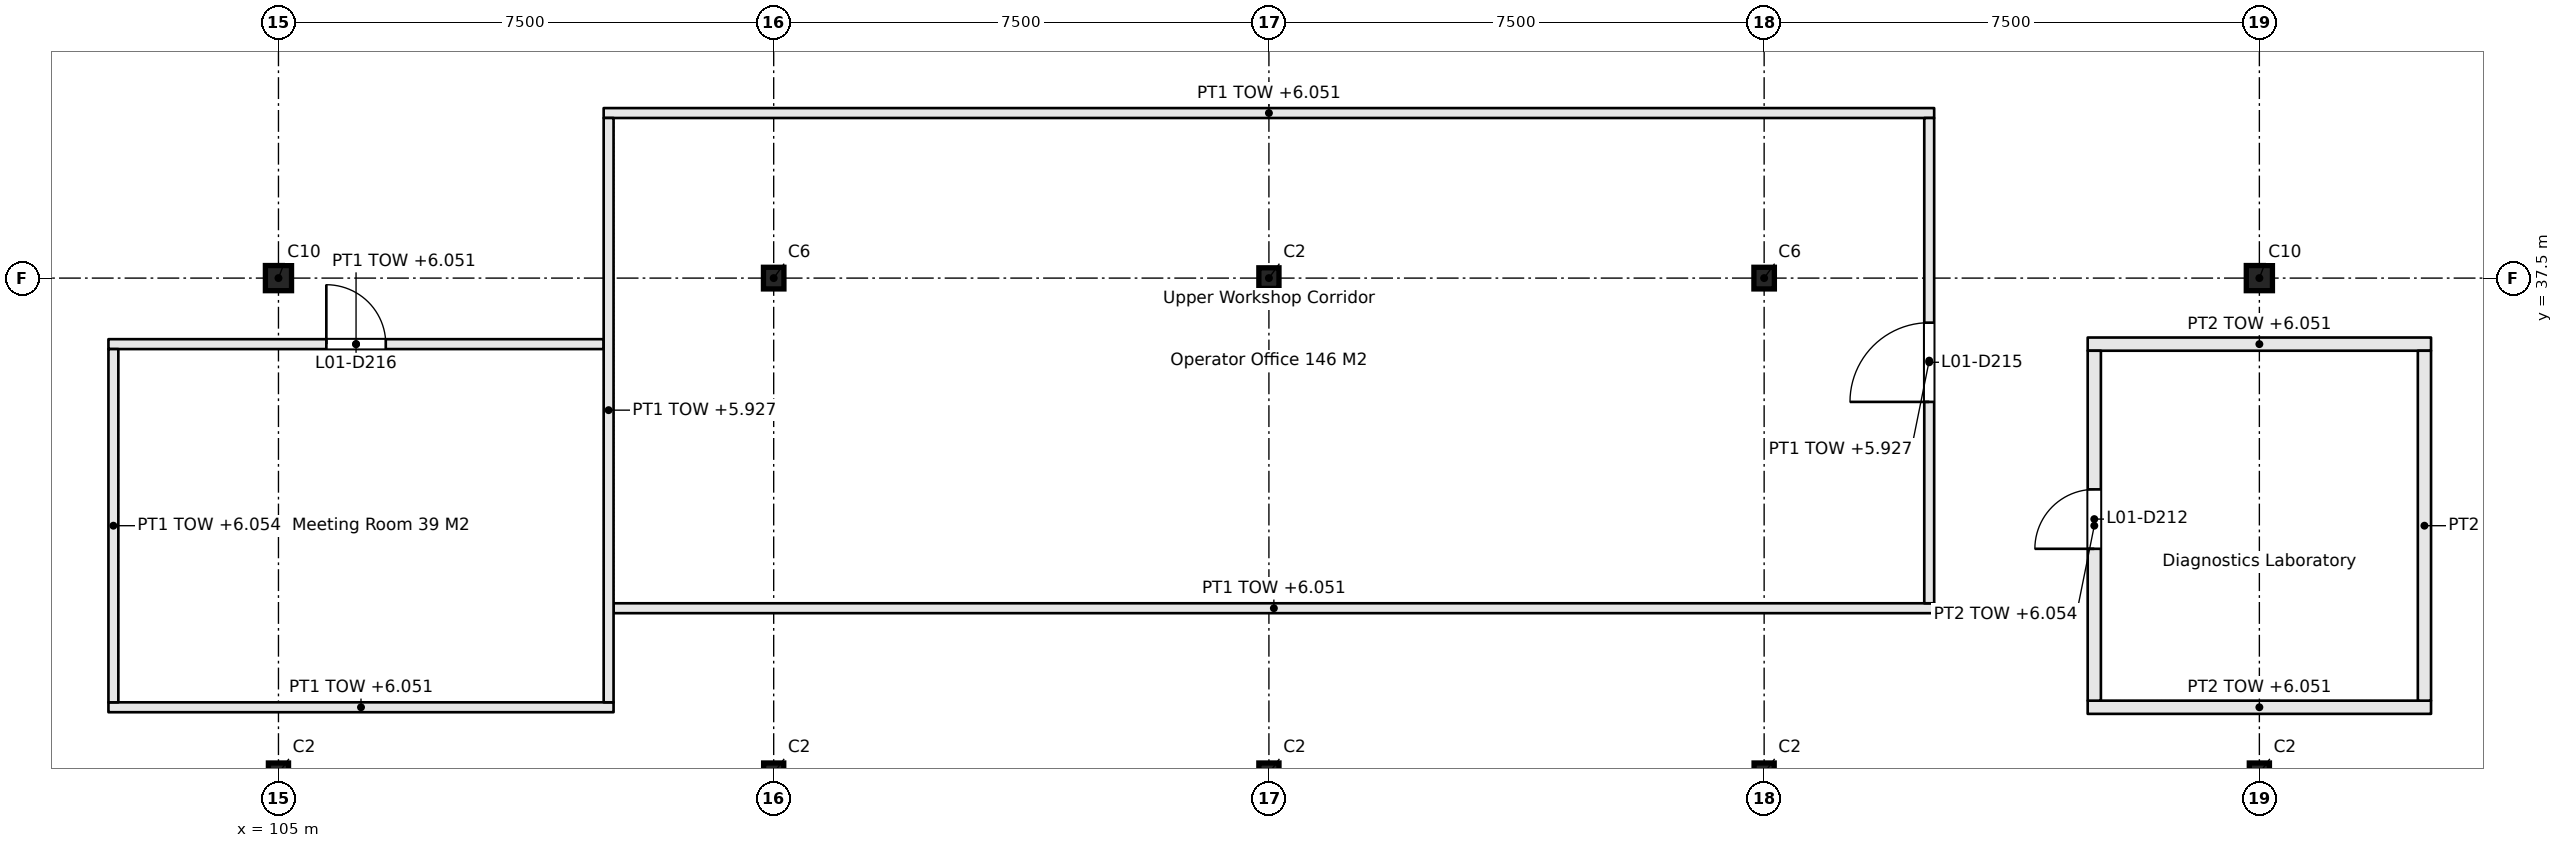
"""IFC4 building model, lengths in metres.
Left out: names, types, materials, properties, quantities, classifications, styles, units other than length and angle.
Written with IfcOpenShell. Run it as: python <this file> out.ifc"""

import sys

from ifc_helpers import new_model, si_unit, direction, frame, frame_2d, origin, origin_2d, place, context, subcontext, project, spatial, rectangle, i_section, extrude, element, fill, save


model = new_model("IFC4")
c1 = context("Model", 3, precision=1e-05, world=origin(), true_north=direction((0.0, 1.0)))
c2 = subcontext(c1, "Body", "Model", "MODEL_VIEW")
j1 = project(units=[si_unit("LENGTHUNIT", "METRE"), si_unit("PLANEANGLEUNIT", "RADIAN")], contexts=[c1])
p1 = place(None, origin())
s1 = spatial("IfcSite", under=j1, at=p1, CompositionType="ELEMENT")
p2 = place(p1, origin())
s2 = spatial("IfcBuilding", under=s1, at=p2, CompositionType="ELEMENT")
p3 = place(p2, frame((0.0, 0.0, 3.3)))
s3 = spatial("IfcBuildingStorey", under=s2, at=p3, CompositionType="ELEMENT", Elevation=3.3)
p4 = place(p3, frame((105.0, 30.0, 0.0), z_axis=(0.0, 0.0, 1.0), x_axis=(1.0, 0.0, 0.0)))
e1 = element("IfcColumn", 1, at=p4, inside=s3, PredefinedType="COLUMN", context=c2, shape_type="SweptSolid", body=[
    extrude(i_section(OverallWidth=0.305, OverallDepth=0.312, WebThickness=0.011, FlangeThickness=0.017, FilletRadius=0.015, at=origin_2d()), origin(), (0.0, 0.0, 1.0), 3.3),
])
p5 = place(p3, frame((105.0, 37.5, 0.0), z_axis=(0.0, 0.0, 1.0), x_axis=(1.0, 0.0, 0.0)))
e2 = element("IfcColumn", 2, at=p5, inside=s3, PredefinedType="COLUMN", context=c2, shape_type="SweptSolid", body=[
    extrude(i_section(OverallWidth=0.396, OverallDepth=0.381, WebThickness=0.019, FlangeThickness=0.03, FilletRadius=0.015, at=origin_2d()), origin(), (0.0, 0.0, 1.0), 3.3),
])
p6 = place(p3, frame((112.5, 30.0, 0.0), z_axis=(0.0, 0.0, 1.0), x_axis=(1.0, 0.0, 0.0)))
e3 = element("IfcColumn", 3, at=p6, inside=s3, PredefinedType="COLUMN", context=c2, shape_type="SweptSolid", body=[
    extrude(i_section(OverallWidth=0.305, OverallDepth=0.312, WebThickness=0.011, FlangeThickness=0.017, FilletRadius=0.015, at=origin_2d()), origin(), (0.0, 0.0, 1.0), 3.3),
])
p7 = place(p3, frame((112.5, 37.5, 0.0), z_axis=(0.0, 0.0, 1.0), x_axis=(1.0, 0.0, 0.0)))
e4 = element("IfcColumn", 4, at=p7, inside=s3, PredefinedType="COLUMN", context=c2, shape_type="SweptSolid", body=[
    extrude(i_section(OverallWidth=0.31, OverallDepth=0.328, WebThickness=0.015, FlangeThickness=0.025, FilletRadius=0.015, at=origin_2d()), origin(), (0.0, 0.0, 1.0), 3.3),
])
for number, where, z_axis, x_axis in (
    (5, (120.0, 30.0, 0.0), (0.0, 0.0, 1.0), (1.0, 0.0, 0.0)),
    (6, (120.0, 37.5, 0.0), (0.0, 0.0, 1.0), (1.0, 0.0, 0.0)),
    (7, (127.5, 30.0, 0.0), (0.0, 0.0, 1.0), (1.0, 0.0, 0.0)),
):
    element("IfcColumn", number, at=place(p3, frame(where, z_axis=z_axis, x_axis=x_axis)), inside=s3, PredefinedType="COLUMN", context=c2, shape_type="SweptSolid", body=[
        extrude(i_section(OverallWidth=0.305, OverallDepth=0.312, WebThickness=0.011, FlangeThickness=0.017, FilletRadius=0.015, at=origin_2d()), origin(), (0.0, 0.0, 1.0), 3.3),
    ])
p8 = place(p3, frame((127.5, 37.5, 0.0), z_axis=(0.0, 0.0, 1.0), x_axis=(1.0, 0.0, 0.0)))
e8 = element("IfcColumn", 8, at=p8, inside=s3, PredefinedType="COLUMN", context=c2, shape_type="SweptSolid", body=[
    extrude(i_section(OverallWidth=0.31, OverallDepth=0.328, WebThickness=0.015, FlangeThickness=0.025, FilletRadius=0.015, at=origin_2d()), origin(), (0.0, 0.0, 1.0), 3.3),
])
p9 = place(p3, frame((135.0, 30.0, 0.0), z_axis=(0.0, 0.0, 1.0), x_axis=(1.0, 0.0, 0.0)))
e9 = element("IfcColumn", 9, at=p9, inside=s3, PredefinedType="COLUMN", context=c2, shape_type="SweptSolid", body=[
    extrude(i_section(OverallWidth=0.305, OverallDepth=0.312, WebThickness=0.011, FlangeThickness=0.017, FilletRadius=0.015, at=origin_2d()), origin(), (0.0, 0.0, 1.0), 3.3),
])
p10 = place(p3, frame((135.0, 37.5, 0.0), z_axis=(0.0, 0.0, 1.0), x_axis=(1.0, 0.0, 0.0)))
e10 = element("IfcColumn", 10, at=p10, inside=s3, PredefinedType="COLUMN", context=c2, shape_type="SweptSolid", body=[
    extrude(i_section(OverallWidth=0.396, OverallDepth=0.381, WebThickness=0.019, FlangeThickness=0.03, FilletRadius=0.015, at=origin_2d()), origin(), (0.0, 0.0, 1.0), 3.3),
])
p11 = place(p3, frame((102.425, 31.0, 0.0), z_axis=(0.0, 0.0, 1.0), x_axis=(1.0, 0.0, 0.0)))
e11 = element("IfcWall", 11, at=p11, inside=s3, PredefinedType="PARTITIONING", context=c2, shape_type="SweptSolid", body=[
    extrude(rectangle(XDim=7.65, YDim=0.15, at=frame_2d((3.825, 0.0))), origin(), (0.0, 0.0, 1.0), 2.751),
])
p12 = place(p3, frame((132.4, 31.0, 0.0), z_axis=(0.0, 0.0, 1.0), x_axis=(1.0, 0.0, 0.0)))
e12 = element("IfcWall", 12, at=p12, inside=s3, PredefinedType="PARTITIONING", context=c2, shape_type="SweptSolid", body=[
    extrude(rectangle(XDim=5.2, YDim=0.2, at=frame_2d((2.6, 0.0))), origin(), (0.0, 0.0, 1.0), 2.751),
])
p13 = place(p3, frame((110.075, 32.5, 0.0), z_axis=(0.0, 0.0, 1.0), x_axis=(1.0, 0.0, 0.0)))
e13 = element("IfcWall", 13, at=p13, inside=s3, PredefinedType="PARTITIONING", context=c2, shape_type="SweptSolid", body=[
    extrude(rectangle(XDim=20.0, YDim=0.15, at=frame_2d((10.0, 0.0))), origin(), (0.0, 0.0, 1.0), 2.751),
])
p14 = place(p3, frame((102.425, 36.5, 0.0), z_axis=(0.0, 0.0, 1.0), x_axis=(1.0, 0.0, 0.0)))
e14 = element("IfcWall", 14, at=p14, inside=s3, PredefinedType="PARTITIONING", context=c2, shape_type="SweptSolid", body=[
    extrude(rectangle(XDim=7.5, YDim=0.15, at=frame_2d((3.75, 0.0))), origin(), (0.0, 0.0, 1.0), 2.751),
])
p15 = place(p14, frame((3.3, 0.0, 0.0)))
e15 = element("IfcOpeningElement", 15, at=p15, cuts=e14, PredefinedType="OPENING", context=c2, shape_type="SweptSolid", body=[
    extrude(rectangle(XDim=0.9, YDim=2.1, at=frame_2d((0.45, 1.05))), frame((0.0, 0.085, 0.0), z_axis=(0.0, -1.0, 0.0), x_axis=(1.0, 0.0, 0.0)), (0.0, 0.0, 1.0), 0.17),
])
p16 = place(p3, frame((132.4, 36.5, 0.0), z_axis=(0.0, 0.0, 1.0), x_axis=(1.0, 0.0, 0.0)))
e16 = element("IfcWall", 16, at=p16, inside=s3, PredefinedType="PARTITIONING", context=c2, shape_type="SweptSolid", body=[
    extrude(rectangle(XDim=5.2, YDim=0.2, at=frame_2d((2.6, 0.0))), origin(), (0.0, 0.0, 1.0), 2.751),
])
p17 = place(p3, frame((109.925, 40.0, 0.0), z_axis=(0.0, 0.0, 1.0), x_axis=(1.0, 0.0, 0.0)))
e17 = element("IfcWall", 17, at=p17, inside=s3, PredefinedType="PARTITIONING", context=c2, shape_type="SweptSolid", body=[
    extrude(rectangle(XDim=20.15, YDim=0.15, at=frame_2d((10.075, 0.0))), origin(), (0.0, 0.0, 1.0), 2.751),
])
p18 = place(p3, frame((102.5, 31.075, 0.0), z_axis=(0.0, 0.0, 1.0), x_axis=(0.0, 1.0, 0.0)))
e18 = element("IfcWall", 18, at=p18, inside=s3, PredefinedType="PARTITIONING", context=c2, shape_type="SweptSolid", body=[
    extrude(rectangle(XDim=5.35, YDim=0.15, at=frame_2d((2.675, 0.0))), origin(), (0.0, 0.0, 1.0), 2.754),
])
p19 = place(p3, frame((110.0, 31.075, 0.0), z_axis=(0.0, 0.0, 1.0), x_axis=(0.0, 1.0, 0.0)))
e19 = element("IfcWall", 19, at=p19, inside=s3, PredefinedType="PARTITIONING", context=c2, shape_type="SweptSolid", body=[
    extrude(rectangle(XDim=8.85, YDim=0.15, at=frame_2d((4.425, 0.0))), origin(), (0.0, 0.0, 1.0), 2.627),
])
p20 = place(p3, frame((130.0, 32.575, 0.0), z_axis=(0.0, 0.0, 1.0), x_axis=(0.0, 1.0, 0.0)))
e20 = element("IfcWall", 20, at=p20, inside=s3, PredefinedType="PARTITIONING", context=c2, shape_type="SweptSolid", body=[
    extrude(rectangle(XDim=7.35, YDim=0.15, at=frame_2d((3.675, 0.0))), origin(), (0.0, 0.0, 1.0), 2.627),
])
p21 = place(p20, frame((3.05, 0.0, 0.0)))
e21 = element("IfcOpeningElement", 21, at=p21, cuts=e20, PredefinedType="OPENING", context=c2, shape_type="SweptSolid", body=[
    extrude(rectangle(XDim=1.2, YDim=2.1, at=frame_2d((0.6, 1.05))), frame((0.0, 0.085, 0.0), z_axis=(0.0, -1.0, 0.0), x_axis=(1.0, 0.0, 0.0)), (0.0, 0.0, 1.0), 0.17),
])
p22 = place(p3, frame((132.5, 31.1, 0.0), z_axis=(0.0, 0.0, 1.0), x_axis=(0.0, 1.0, 0.0)))
e22 = element("IfcWall", 22, at=p22, inside=s3, PredefinedType="PARTITIONING", context=c2, shape_type="SweptSolid", body=[
    extrude(rectangle(XDim=5.3, YDim=0.2, at=frame_2d((2.65, 0.0))), origin(), (0.0, 0.0, 1.0), 2.754),
])
p23 = place(p22, frame((2.3, 0.0, 0.0)))
e23 = element("IfcOpeningElement", 23, at=p23, cuts=e22, PredefinedType="OPENING", context=c2, shape_type="SweptSolid", body=[
    extrude(rectangle(XDim=0.9, YDim=2.1, at=frame_2d((0.45, 1.05))), frame((0.0, 0.11, 0.0), z_axis=(0.0, -1.0, 0.0), x_axis=(1.0, 0.0, 0.0)), (0.0, 0.0, 1.0), 0.22),
])
p24 = place(p3, frame((137.5, 31.1, 0.0), z_axis=(0.0, 0.0, 1.0), x_axis=(0.0, 1.0, 0.0)))
e24 = element("IfcWall", 24, at=p24, inside=s3, PredefinedType="PARTITIONING", context=c2, shape_type="SweptSolid", body=[
    extrude(rectangle(XDim=5.3, YDim=0.2, at=frame_2d((2.65, 0.0))), origin(), (0.0, 0.0, 1.0), 2.754),
])
p25 = place(p23, origin())
e25 = element("IfcDoor", 25, at=p25, inside=s3, OperationType="SINGLE_SWING_RIGHT", PredefinedType="DOOR", context=c2, shape_type="SweptSolid", body=[
    extrude(rectangle(XDim=0.9, YDim=2.1, at=frame_2d((0.45, 1.05))), frame((0.0, 0.025, 0.0), z_axis=(0.0, -1.0, 0.0), x_axis=(1.0, 0.0, 0.0)), (0.0, 0.0, 1.0), 0.05),
])
fill(e23, e25)
p26 = place(p21, origin())
e26 = element("IfcDoor", 26, at=p26, inside=s3, OperationType="DOUBLE_DOOR_SINGLE_SWING", PredefinedType="DOOR", context=c2, shape_type="SweptSolid", body=[
    extrude(rectangle(XDim=1.2, YDim=2.1, at=frame_2d((0.6, 1.05))), frame((0.0, 0.025, 0.0), z_axis=(0.0, -1.0, 0.0), x_axis=(1.0, 0.0, 0.0)), (0.0, 0.0, 1.0), 0.05),
])
fill(e21, e26)
p27 = place(p15, origin())
e27 = element("IfcDoor", 27, at=p27, inside=s3, OperationType="SINGLE_SWING_RIGHT", PredefinedType="DOOR", context=c2, shape_type="SweptSolid", body=[
    extrude(rectangle(XDim=0.9, YDim=2.1, at=frame_2d((0.45, 1.05))), frame((0.0, 0.025, 0.0), z_axis=(0.0, -1.0, 0.0), x_axis=(1.0, 0.0, 0.0)), (0.0, 0.0, 1.0), 0.05),
])
fill(e15, e27)
save(model, sys.argv[1])
